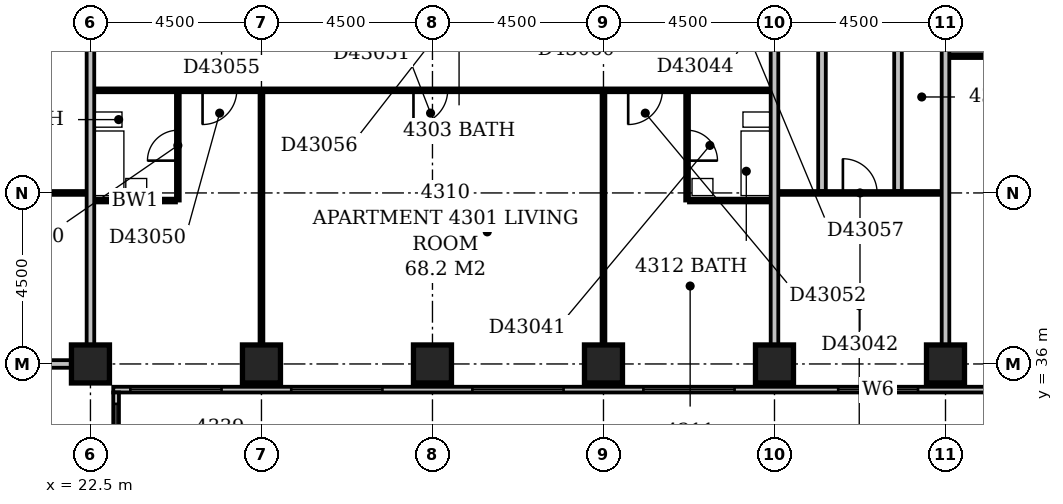
"""IFC4 building model, lengths in metres.
Left out: names, types, materials, properties, quantities, classifications, styles, units other than length and angle.
Written with IfcOpenShell. Run it as: python <this file> out.ifc"""

import sys

from ifc_helpers import new_model, si_unit, direction, frame, frame_2d, origin, origin_2d, place, context, subcontext, project, spatial, rectangle, extrude, element, fill, save


model = new_model("IFC4")
c1 = context("Model", 3, precision=1e-05, world=origin(), true_north=direction((0.0, 1.0)))
c2 = subcontext(c1, "Body", "Model", "MODEL_VIEW")
j1 = project(units=[si_unit("LENGTHUNIT", "METRE"), si_unit("PLANEANGLEUNIT", "RADIAN")], contexts=[c1])
p1 = place(None, origin())
s1 = spatial("IfcSite", under=j1, at=p1, CompositionType="ELEMENT")
p2 = place(p1, origin())
s2 = spatial("IfcBuilding", under=s1, at=p2, CompositionType="ELEMENT")
p3 = place(p2, frame((0.0, 0.0, 170.0)))
s3 = spatial("IfcBuildingStorey", under=s2, at=p3, CompositionType="ELEMENT", Elevation=170.0)
for number, where, z_axis, x_axis in (
    (1, (22.5, 36.0, -0.3), (0.0, 0.0, 1.0), (1.0, 0.0, 0.0)),
    (2, (27.0, 36.0, -0.3), (0.0, 0.0, 1.0), (1.0, 0.0, 0.0)),
    (3, (31.5, 36.0, -0.3), (0.0, 0.0, 1.0), (1.0, 0.0, 0.0)),
    (4, (36.0, 36.0, -0.3), (0.0, 0.0, 1.0), (1.0, 0.0, 0.0)),
    (5, (40.5, 36.0, -0.3), (0.0, 0.0, 1.0), (1.0, 0.0, 0.0)),
    (6, (45.0, 36.0, -0.3), (0.0, 0.0, 1.0), (1.0, 0.0, 0.0)),
):
    element("IfcColumn", number, at=place(p3, frame(where, z_axis=z_axis, x_axis=x_axis)), inside=s3, PredefinedType="COLUMN", context=c2, shape_type="SweptSolid", body=[
        extrude(rectangle(XDim=1.0, YDim=1.0, at=origin_2d()), origin(), (0.0, 0.0, 1.0), 3.45),
    ])
p4 = place(p3, frame((23.175, 17.4, 0.0), z_axis=(0.0, 0.0, 1.0), x_axis=(0.0, 1.0, 0.0)))
e7 = element("IfcWall", 7, at=p4, inside=s3, PredefinedType="STANDARD", context=c2, shape_type="SweptSolid", body=[
    extrude(rectangle(XDim=17.85, YDim=0.15, at=frame_2d((8.925, 0.0))), origin(), (0.0, 0.0, 1.0), 2.5),
])
p5 = place(p4, frame((1.65, 0.0, 0.6)))
e8 = element("IfcOpeningElement", 8, at=p5, cuts=e7, PredefinedType="OPENING", context=c2, shape_type="SweptSolid", body=[
    extrude(rectangle(XDim=2.4, YDim=1.8, at=frame_2d((1.2, 0.9))), frame((0.0, 0.087, 0.0), z_axis=(0.0, -1.0, 0.0), x_axis=(1.0, 0.0, 0.0)), (0.0, 0.0, 1.0), 0.174),
])
p6 = place(p4, frame((6.15, 0.0, 0.6)))
e9 = element("IfcOpeningElement", 9, at=p6, cuts=e7, PredefinedType="OPENING", context=c2, shape_type="SweptSolid", body=[
    extrude(rectangle(XDim=2.4, YDim=1.8, at=frame_2d((1.2, 0.9))), frame((0.0, 0.087, 0.0), z_axis=(0.0, -1.0, 0.0), x_axis=(1.0, 0.0, 0.0)), (0.0, 0.0, 1.0), 0.174),
])
p7 = place(p4, frame((11.875, 0.0, 0.6)))
e10 = element("IfcOpeningElement", 10, at=p7, cuts=e7, PredefinedType="OPENING", context=c2, shape_type="SweptSolid", body=[
    extrude(rectangle(XDim=1.5, YDim=1.8, at=frame_2d((0.75, 0.9))), frame((0.0, 0.087, 0.0), z_axis=(0.0, -1.0, 0.0), x_axis=(1.0, 0.0, 0.0)), (0.0, 0.0, 1.0), 0.174),
])
p8 = place(p4, frame((15.15, 0.0, 0.6)))
e11 = element("IfcOpeningElement", 11, at=p8, cuts=e7, PredefinedType="OPENING", context=c2, shape_type="SweptSolid", body=[
    extrude(rectangle(XDim=2.4, YDim=1.8, at=frame_2d((1.2, 0.9))), frame((0.0, 0.087, 0.0), z_axis=(0.0, -1.0, 0.0), x_axis=(1.0, 0.0, 0.0)), (0.0, 0.0, 1.0), 0.174),
])
p9 = place(p3, frame((23.1, 35.325, 0.0), z_axis=(0.0, 0.0, 1.0), x_axis=(1.0, 0.0, 0.0)))
e12 = element("IfcWall", 12, at=p9, inside=s3, PredefinedType="STANDARD", context=c2, shape_type="SweptSolid", body=[
    extrude(rectangle(XDim=45.15, YDim=0.15, at=frame_2d((22.575, 0.0))), origin(), (0.0, 0.0, 1.0), 2.5),
])
p10 = place(p9, frame((0.45, 0.0, 0.6)))
e13 = element("IfcOpeningElement", 13, at=p10, cuts=e12, PredefinedType="OPENING", context=c2, shape_type="SweptSolid", body=[
    extrude(rectangle(XDim=2.4, YDim=1.8, at=frame_2d((1.2, 0.9))), frame((0.0, 0.087, 0.0), z_axis=(0.0, -1.0, 0.0), x_axis=(1.0, 0.0, 0.0)), (0.0, 0.0, 1.0), 0.174),
])
p11 = place(p9, frame((4.684, 0.0, 0.6)))
e14 = element("IfcOpeningElement", 14, at=p11, cuts=e12, PredefinedType="OPENING", context=c2, shape_type="SweptSolid", body=[
    extrude(rectangle(XDim=2.4, YDim=1.8, at=frame_2d((1.2, 0.9))), frame((0.0, 0.087, 0.0), z_axis=(0.0, -1.0, 0.0), x_axis=(1.0, 0.0, 0.0)), (0.0, 0.0, 1.0), 0.174),
])
p12 = place(p9, frame((9.45, 0.0, 0.6)))
e15 = element("IfcOpeningElement", 15, at=p12, cuts=e12, PredefinedType="OPENING", context=c2, shape_type="SweptSolid", body=[
    extrude(rectangle(XDim=2.4, YDim=1.8, at=frame_2d((1.2, 0.9))), frame((0.0, 0.087, 0.0), z_axis=(0.0, -1.0, 0.0), x_axis=(1.0, 0.0, 0.0)), (0.0, 0.0, 1.0), 0.174),
])
p13 = place(p9, frame((13.95, 0.0, 0.6)))
e16 = element("IfcOpeningElement", 16, at=p13, cuts=e12, PredefinedType="OPENING", context=c2, shape_type="SweptSolid", body=[
    extrude(rectangle(XDim=2.4, YDim=1.8, at=frame_2d((1.2, 0.9))), frame((0.0, 0.087, 0.0), z_axis=(0.0, -1.0, 0.0), x_axis=(1.0, 0.0, 0.0)), (0.0, 0.0, 1.0), 0.174),
])
p14 = place(p9, frame((19.076, 0.0, 0.6)))
e17 = element("IfcOpeningElement", 17, at=p14, cuts=e12, PredefinedType="OPENING", context=c2, shape_type="SweptSolid", body=[
    extrude(rectangle(XDim=2.1, YDim=1.8, at=frame_2d((1.05, 0.9))), frame((0.0, 0.087, 0.0), z_axis=(0.0, -1.0, 0.0), x_axis=(1.0, 0.0, 0.0)), (0.0, 0.0, 1.0), 0.174),
])
p15 = place(p9, frame((22.95, 0.0, 0.6)))
e18 = element("IfcOpeningElement", 18, at=p15, cuts=e12, PredefinedType="OPENING", context=c2, shape_type="SweptSolid", body=[
    extrude(rectangle(XDim=2.4, YDim=1.8, at=frame_2d((1.2, 0.9))), frame((0.0, 0.087, 0.0), z_axis=(0.0, -1.0, 0.0), x_axis=(1.0, 0.0, 0.0)), (0.0, 0.0, 1.0), 0.174),
])
p16 = place(p9, frame((27.45, 0.0, 0.6)))
e19 = element("IfcOpeningElement", 19, at=p16, cuts=e12, PredefinedType="OPENING", context=c2, shape_type="SweptSolid", body=[
    extrude(rectangle(XDim=2.4, YDim=1.8, at=frame_2d((1.2, 0.9))), frame((0.0, 0.087, 0.0), z_axis=(0.0, -1.0, 0.0), x_axis=(1.0, 0.0, 0.0)), (0.0, 0.0, 1.0), 0.174),
])
p17 = place(p9, frame((31.95, 0.0, 0.6)))
e20 = element("IfcOpeningElement", 20, at=p17, cuts=e12, PredefinedType="OPENING", context=c2, shape_type="SweptSolid", body=[
    extrude(rectangle(XDim=2.4, YDim=1.8, at=frame_2d((1.2, 0.9))), frame((0.0, 0.087, 0.0), z_axis=(0.0, -1.0, 0.0), x_axis=(1.0, 0.0, 0.0)), (0.0, 0.0, 1.0), 0.174),
])
p18 = place(p9, frame((38.285, 0.0, 0.6)))
e21 = element("IfcOpeningElement", 21, at=p18, cuts=e12, PredefinedType="OPENING", context=c2, shape_type="SweptSolid", body=[
    extrude(rectangle(XDim=0.9, YDim=1.8, at=frame_2d((0.45, 0.9))), frame((0.0, 0.087, 0.0), z_axis=(0.0, -1.0, 0.0), x_axis=(1.0, 0.0, 0.0)), (0.0, 0.0, 1.0), 0.174),
])
p19 = place(p9, frame((40.95, 0.0, 0.6)))
e22 = element("IfcOpeningElement", 22, at=p19, cuts=e12, PredefinedType="OPENING", context=c2, shape_type="SweptSolid", body=[
    extrude(rectangle(XDim=2.4, YDim=1.8, at=frame_2d((1.2, 0.9))), frame((0.0, 0.087, 0.0), z_axis=(0.0, -1.0, 0.0), x_axis=(1.0, 0.0, 0.0)), (0.0, 0.0, 1.0), 0.174),
])
for number, where, z_axis, x_axis in (
    (23, (9.1, 36.0, 0.0), (0.0, 0.0, 1.0), (1.0, 0.0, 0.0)),
    (24, (22.5, 36.5, 0.0), (0.0, 0.0, 1.0), (0.0, 1.0, 0.0)),
):
    element("IfcWall", number, at=place(p3, frame(where, z_axis=z_axis, x_axis=x_axis)), inside=s3, PredefinedType="PARTITIONING", context=c2, shape_type="SweptSolid", body=[
        extrude(rectangle(XDim=12.9, YDim=0.2, at=frame_2d((6.45, 0.0))), origin(), (0.0, 0.0, 1.0), 3.15),
    ])
p20 = place(p3, frame((27.0, 36.5, 0.0), z_axis=(0.0, 0.0, 1.0), x_axis=(0.0, 1.0, 0.0)))
e25 = element("IfcWall", 25, at=p20, inside=s3, PredefinedType="PARTITIONING", context=c2, shape_type="SweptSolid", body=[
    extrude(rectangle(XDim=6.65, YDim=0.1, at=frame_2d((3.325, 0.0))), origin(), (0.0, 0.0, 1.0), 2.45),
])
p21 = place(p3, frame((36.0, 36.5, 0.0), z_axis=(0.0, 0.0, 1.0), x_axis=(0.0, 1.0, 0.0)))
e26 = element("IfcWall", 26, at=p21, inside=s3, PredefinedType="PARTITIONING", context=c2, shape_type="SweptSolid", body=[
    extrude(rectangle(XDim=6.65, YDim=0.1, at=frame_2d((3.325, 0.0))), origin(), (0.0, 0.0, 1.0), 2.25),
])
p22 = place(p3, frame((40.5, 36.5, 0.0), z_axis=(0.0, 0.0, 1.0), x_axis=(0.0, 1.0, 0.0)))
e27 = element("IfcWall", 27, at=p22, inside=s3, PredefinedType="PARTITIONING", context=c2, shape_type="SweptSolid", body=[
    extrude(rectangle(XDim=12.9, YDim=0.2, at=frame_2d((6.45, 0.0))), origin(), (0.0, 0.0, 1.0), 3.15),
])
p23 = place(p3, frame((45.0, 36.5, 0.0), z_axis=(0.0, 0.0, 1.0), x_axis=(0.0, 1.0, 0.0)))
e28 = element("IfcWall", 28, at=p23, inside=s3, PredefinedType="PARTITIONING", context=c2, shape_type="SweptSolid", body=[
    extrude(rectangle(XDim=12.9, YDim=0.2, at=frame_2d((6.45, 0.0))), origin(), (0.0, 0.0, 1.0), 2.45),
])
p24 = place(p3, frame((22.6, 40.3, 0.0), z_axis=(0.0, 0.0, 1.0), x_axis=(1.0, 0.0, 0.0)))
e29 = element("IfcWall", 29, at=p24, inside=s3, PredefinedType="PLUMBINGWALL", context=c2, shape_type="SweptSolid", body=[
    extrude(rectangle(XDim=2.15, YDim=0.1, at=frame_2d((1.075, 0.0))), origin(), (0.0, 0.0, 1.0), 3.15),
])
p25 = place(p3, frame((24.8, 40.3, 0.0), z_axis=(0.0, 0.0, 1.0), x_axis=(0.0, 1.0, 0.0)))
e30 = element("IfcWall", 30, at=p25, inside=s3, PredefinedType="PLUMBINGWALL", context=c2, shape_type="SweptSolid", body=[
    extrude(rectangle(XDim=2.85, YDim=0.1, at=frame_2d((1.425, 0.0))), origin(), (0.0, 0.0, 1.0), 3.15),
])
p26 = place(p25, frame((1.05, 0.0, 0.0)))
e31 = element("IfcOpeningElement", 31, at=p26, cuts=e30, PredefinedType="OPENING", context=c2, shape_type="SweptSolid", body=[
    extrude(rectangle(XDim=0.8, YDim=2.1, at=frame_2d((0.4, 1.05))), frame((0.0, 0.062, 0.0), z_axis=(0.0, -1.0, 0.0), x_axis=(1.0, 0.0, 0.0)), (0.0, 0.0, 1.0), 0.124),
])
p27 = place(p3, frame((38.2, 40.3, 0.0), z_axis=(0.0, 0.0, 1.0), x_axis=(0.0, 1.0, 0.0)))
e32 = element("IfcWall", 32, at=p27, inside=s3, PredefinedType="PLUMBINGWALL", context=c2, shape_type="SweptSolid", body=[
    extrude(rectangle(XDim=2.85, YDim=0.1, at=frame_2d((1.425, 0.0))), origin(), (0.0, 0.0, 1.0), 3.15),
])
p28 = place(p27, frame((1.05, 0.0, 0.0)))
e33 = element("IfcOpeningElement", 33, at=p28, cuts=e32, PredefinedType="OPENING", context=c2, shape_type="SweptSolid", body=[
    extrude(rectangle(XDim=0.8, YDim=2.1, at=frame_2d((0.4, 1.05))), frame((0.0, 0.062, 0.0), z_axis=(0.0, -1.0, 0.0), x_axis=(1.0, 0.0, 0.0)), (0.0, 0.0, 1.0), 0.124),
])
p29 = place(p3, frame((38.25, 40.3, 0.0), z_axis=(0.0, 0.0, 1.0), x_axis=(1.0, 0.0, 0.0)))
e34 = element("IfcWall", 34, at=p29, inside=s3, PredefinedType="PLUMBINGWALL", context=c2, shape_type="SweptSolid", body=[
    extrude(rectangle(XDim=2.15, YDim=0.1, at=frame_2d((1.075, 0.0))), origin(), (0.0, 0.0, 1.0), 3.15),
])
p30 = place(p3, frame((9.1, 40.5, 0.0), z_axis=(0.0, 0.0, 1.0), x_axis=(1.0, 0.0, 0.0)))
e35 = element("IfcWall", 35, at=p30, inside=s3, PredefinedType="PARTITIONING", context=c2, shape_type="SweptSolid", body=[
    extrude(rectangle(XDim=13.3, YDim=0.1, at=frame_2d((6.65, 0.0))), origin(), (0.0, 0.0, 1.0), 3.15),
])
p31 = place(p3, frame((40.6, 40.5, 0.0), z_axis=(0.0, 0.0, 1.0), x_axis=(1.0, 0.0, 0.0)))
e36 = element("IfcWall", 36, at=p31, inside=s3, PredefinedType="PARTITIONING", context=c2, shape_type="SweptSolid", body=[
    extrude(rectangle(XDim=4.3, YDim=0.1, at=frame_2d((2.15, 0.0))), origin(), (0.0, 0.0, 1.0), 3.15),
])
p32 = place(p31, frame((1.7, 0.0, 0.0)))
e37 = element("IfcOpeningElement", 37, at=p32, cuts=e36, PredefinedType="OPENING", context=c2, shape_type="SweptSolid", body=[
    extrude(rectangle(XDim=0.9, YDim=2.1, at=frame_2d((0.45, 1.05))), frame((0.0, 0.062, 0.0), z_axis=(0.0, -1.0, 0.0), x_axis=(1.0, 0.0, 0.0)), (0.0, 0.0, 1.0), 0.124),
])
p33 = place(p3, frame((41.75, 40.55, 0.0), z_axis=(0.0, 0.0, 1.0), x_axis=(0.0, 1.0, 0.0)))
e38 = element("IfcWall", 38, at=p33, inside=s3, PredefinedType="PARTITIONING", context=c2, shape_type="SweptSolid", body=[
    extrude(rectangle(XDim=8.95, YDim=0.2, at=frame_2d((4.475, 0.0))), origin(), (0.0, 0.0, 1.0), 3.15),
])
p34 = place(p33, frame((5.55, 0.0, 0.0)))
e39 = element("IfcOpeningElement", 39, at=p34, cuts=e38, PredefinedType="OPENING", context=c2, shape_type="SweptSolid", body=[
    extrude(rectangle(XDim=0.8, YDim=2.1, at=frame_2d((0.4, 1.05))), frame((0.0, 0.112, 0.0), z_axis=(0.0, -1.0, 0.0), x_axis=(1.0, 0.0, 0.0)), (0.0, 0.0, 1.0), 0.224),
])
p35 = place(p3, frame((43.75, 40.55, 0.0), z_axis=(0.0, 0.0, 1.0), x_axis=(0.0, 1.0, 0.0)))
e40 = element("IfcWall", 40, at=p35, inside=s3, PredefinedType="PARTITIONING", context=c2, shape_type="SweptSolid", body=[
    extrude(rectangle(XDim=8.95, YDim=0.2, at=frame_2d((4.475, 0.0))), origin(), (0.0, 0.0, 1.0), 3.15),
])
p36 = place(p35, frame((5.55, 0.0, 0.0)))
e41 = element("IfcOpeningElement", 41, at=p36, cuts=e40, PredefinedType="OPENING", context=c2, shape_type="SweptSolid", body=[
    extrude(rectangle(XDim=0.8, YDim=2.1, at=frame_2d((0.4, 1.05))), frame((0.0, 0.112, 0.0), z_axis=(0.0, -1.0, 0.0), x_axis=(1.0, 0.0, 0.0)), (0.0, 0.0, 1.0), 0.224),
])
p37 = place(p3, frame((22.6, 43.2, 0.0), z_axis=(0.0, 0.0, 1.0), x_axis=(1.0, 0.0, 0.0)))
e42 = element("IfcWall", 42, at=p37, inside=s3, PredefinedType="PARTITIONING", context=c2, shape_type="SweptSolid", body=[
    extrude(rectangle(XDim=17.8, YDim=0.1, at=frame_2d((8.9, 0.0))), origin(), (0.0, 0.0, 1.0), 3.15),
])
p38 = place(p37, frame((2.85, 0.0, 0.0)))
e43 = element("IfcOpeningElement", 43, at=p38, cuts=e42, PredefinedType="OPENING", context=c2, shape_type="SweptSolid", body=[
    extrude(rectangle(XDim=0.9, YDim=2.1, at=frame_2d((0.45, 1.05))), frame((0.0, 0.062, 0.0), z_axis=(0.0, -1.0, 0.0), x_axis=(1.0, 0.0, 0.0)), (0.0, 0.0, 1.0), 0.124),
])
p39 = place(p37, frame((8.4, 0.0, 0.0)))
e44 = element("IfcOpeningElement", 44, at=p39, cuts=e42, PredefinedType="OPENING", context=c2, shape_type="SweptSolid", body=[
    extrude(rectangle(XDim=0.9, YDim=2.1, at=frame_2d((0.45, 1.05))), frame((0.0, 0.062, 0.0), z_axis=(0.0, -1.0, 0.0), x_axis=(1.0, 0.0, 0.0)), (0.0, 0.0, 1.0), 0.124),
])
p40 = place(p37, frame((14.05, 0.0, 0.0)))
e45 = element("IfcOpeningElement", 45, at=p40, cuts=e42, PredefinedType="OPENING", context=c2, shape_type="SweptSolid", body=[
    extrude(rectangle(XDim=0.9, YDim=2.1, at=frame_2d((0.45, 1.05))), frame((0.0, 0.062, 0.0), z_axis=(0.0, -1.0, 0.0), x_axis=(1.0, 0.0, 0.0)), (0.0, 0.0, 1.0), 0.124),
])
p41 = place(p3, frame((45.1, 44.1, 0.0), z_axis=(0.0, 0.0, 1.0), x_axis=(1.0, 0.0, 0.0)))
e46 = element("IfcWall", 46, at=p41, inside=s3, PredefinedType="PARTITIONING", context=c2, shape_type="SweptSolid", body=[
    extrude(rectangle(XDim=8.8, YDim=0.1, at=frame_2d((4.4, 0.0))), origin(), (0.0, 0.0, 1.0), 3.15),
])
p42 = place(p41, frame((1.7, 0.0, 0.0)))
e47 = element("IfcOpeningElement", 47, at=p42, cuts=e46, PredefinedType="OPENING", context=c2, shape_type="SweptSolid", body=[
    extrude(rectangle(XDim=0.9, YDim=2.1, at=frame_2d((0.45, 1.05))), frame((0.0, 0.062, 0.0), z_axis=(0.0, -1.0, 0.0), x_axis=(1.0, 0.0, 0.0)), (0.0, 0.0, 1.0), 0.124),
])
p43 = place(p41, frame((6.2, 0.0, 0.0)))
e48 = element("IfcOpeningElement", 48, at=p43, cuts=e46, PredefinedType="OPENING", context=c2, shape_type="SweptSolid", body=[
    extrude(rectangle(XDim=0.9, YDim=2.1, at=frame_2d((0.45, 1.05))), frame((0.0, 0.062, 0.0), z_axis=(0.0, -1.0, 0.0), x_axis=(1.0, 0.0, 0.0)), (0.0, 0.0, 1.0), 0.124),
])
p44 = place(p8, origin())
e49 = element("IfcWindow", 49, at=p44, inside=s3, PartitioningType="SINGLE_PANEL", PredefinedType="WINDOW", context=c2, shape_type="SweptSolid", body=[
    extrude(rectangle(XDim=2.4, YDim=1.8, at=frame_2d((1.2, 0.9))), frame((0.0, 0.03, 0.0), z_axis=(0.0, -1.0, 0.0), x_axis=(1.0, 0.0, 0.0)), (0.0, 0.0, 1.0), 0.06),
])
fill(e11, e49)
p45 = place(p10, origin())
e50 = element("IfcWindow", 50, at=p45, inside=s3, PartitioningType="SINGLE_PANEL", PredefinedType="WINDOW", context=c2, shape_type="SweptSolid", body=[
    extrude(rectangle(XDim=2.4, YDim=1.8, at=frame_2d((1.2, 0.9))), frame((0.0, 0.03, 0.0), z_axis=(0.0, -1.0, 0.0), x_axis=(1.0, 0.0, 0.0)), (0.0, 0.0, 1.0), 0.06),
])
fill(e13, e50)
p46 = place(p11, origin())
e51 = element("IfcWindow", 51, at=p46, inside=s3, PartitioningType="SINGLE_PANEL", PredefinedType="WINDOW", context=c2, shape_type="SweptSolid", body=[
    extrude(rectangle(XDim=2.4, YDim=1.8, at=frame_2d((1.2, 0.9))), frame((0.0, 0.03, 0.0), z_axis=(0.0, -1.0, 0.0), x_axis=(1.0, 0.0, 0.0)), (0.0, 0.0, 1.0), 0.06),
])
fill(e14, e51)
p47 = place(p12, origin())
e52 = element("IfcWindow", 52, at=p47, inside=s3, PartitioningType="SINGLE_PANEL", PredefinedType="WINDOW", context=c2, shape_type="SweptSolid", body=[
    extrude(rectangle(XDim=2.4, YDim=1.8, at=frame_2d((1.2, 0.9))), frame((0.0, 0.03, 0.0), z_axis=(0.0, -1.0, 0.0), x_axis=(1.0, 0.0, 0.0)), (0.0, 0.0, 1.0), 0.06),
])
fill(e15, e52)
p48 = place(p13, origin())
e53 = element("IfcWindow", 53, at=p48, inside=s3, PartitioningType="SINGLE_PANEL", PredefinedType="WINDOW", context=c2, shape_type="SweptSolid", body=[
    extrude(rectangle(XDim=2.4, YDim=1.8, at=frame_2d((1.2, 0.9))), frame((0.0, 0.03, 0.0), z_axis=(0.0, -1.0, 0.0), x_axis=(1.0, 0.0, 0.0)), (0.0, 0.0, 1.0), 0.06),
])
fill(e16, e53)
p49 = place(p14, origin())
e54 = element("IfcWindow", 54, at=p49, inside=s3, PartitioningType="SINGLE_PANEL", PredefinedType="WINDOW", context=c2, shape_type="SweptSolid", body=[
    extrude(rectangle(XDim=2.1, YDim=1.8, at=frame_2d((1.05, 0.9))), frame((0.0, 0.03, 0.0), z_axis=(0.0, -1.0, 0.0), x_axis=(1.0, 0.0, 0.0)), (0.0, 0.0, 1.0), 0.06),
])
fill(e17, e54)
p50 = place(p26, origin())
e55 = element("IfcDoor", 55, at=p50, inside=s3, OperationType="SINGLE_SWING_LEFT", PredefinedType="DOOR", context=c2, shape_type="SweptSolid", body=[
    extrude(rectangle(XDim=0.8, YDim=2.1, at=frame_2d((0.4, 1.05))), frame((0.0, 0.025, 0.0), z_axis=(0.0, -1.0, 0.0), x_axis=(1.0, 0.0, 0.0)), (0.0, 0.0, 1.0), 0.05),
])
fill(e31, e55)
p51 = place(p28, frame((0.8, 0.0, 0.0), z_axis=(0.0, 0.0, 1.0), x_axis=(-1.0, 0.0, 0.0)))
e56 = element("IfcDoor", 56, at=p51, inside=s3, OperationType="SINGLE_SWING_RIGHT", PredefinedType="DOOR", context=c2, shape_type="SweptSolid", body=[
    extrude(rectangle(XDim=0.8, YDim=2.1, at=frame_2d((0.4, 1.05))), frame((0.0, 0.025, 0.0), z_axis=(0.0, -1.0, 0.0), x_axis=(1.0, 0.0, 0.0)), (0.0, 0.0, 1.0), 0.05),
])
fill(e33, e56)
p52 = place(p32, origin())
e57 = element("IfcDoor", 57, at=p52, inside=s3, OperationType="SINGLE_SWING_LEFT", PredefinedType="DOOR", context=c2, shape_type="SweptSolid", body=[
    extrude(rectangle(XDim=0.9, YDim=2.1, at=frame_2d((0.45, 1.05))), frame((0.0, 0.025, 0.0), z_axis=(0.0, -1.0, 0.0), x_axis=(1.0, 0.0, 0.0)), (0.0, 0.0, 1.0), 0.05),
])
fill(e37, e57)
p53 = place(p38, frame((0.9, 0.0, 0.0), z_axis=(0.0, 0.0, 1.0), x_axis=(-1.0, 0.0, 0.0)))
e58 = element("IfcDoor", 58, at=p53, inside=s3, OperationType="SINGLE_SWING_RIGHT", PredefinedType="DOOR", context=c2, shape_type="SweptSolid", body=[
    extrude(rectangle(XDim=0.9, YDim=2.1, at=frame_2d((0.45, 1.05))), frame((0.0, 0.025, 0.0), z_axis=(0.0, -1.0, 0.0), x_axis=(1.0, 0.0, 0.0)), (0.0, 0.0, 1.0), 0.05),
])
fill(e43, e58)
p54 = place(p39, frame((0.9, 0.0, 0.0), z_axis=(0.0, 0.0, 1.0), x_axis=(-1.0, 0.0, 0.0)))
e59 = element("IfcDoor", 59, at=p54, inside=s3, OperationType="SINGLE_SWING_RIGHT", PredefinedType="DOOR", context=c2, shape_type="SweptSolid", body=[
    extrude(rectangle(XDim=0.9, YDim=2.1, at=frame_2d((0.45, 1.05))), frame((0.0, 0.025, 0.0), z_axis=(0.0, -1.0, 0.0), x_axis=(1.0, 0.0, 0.0)), (0.0, 0.0, 1.0), 0.05),
])
fill(e44, e59)
p55 = place(p40, frame((0.9, 0.0, 0.0), z_axis=(0.0, 0.0, 1.0), x_axis=(-1.0, 0.0, 0.0)))
e60 = element("IfcDoor", 60, at=p55, inside=s3, OperationType="SINGLE_SWING_RIGHT", PredefinedType="DOOR", context=c2, shape_type="SweptSolid", body=[
    extrude(rectangle(XDim=0.9, YDim=2.1, at=frame_2d((0.45, 1.05))), frame((0.0, 0.025, 0.0), z_axis=(0.0, -1.0, 0.0), x_axis=(1.0, 0.0, 0.0)), (0.0, 0.0, 1.0), 0.05),
])
fill(e45, e60)
save(model, sys.argv[1])
